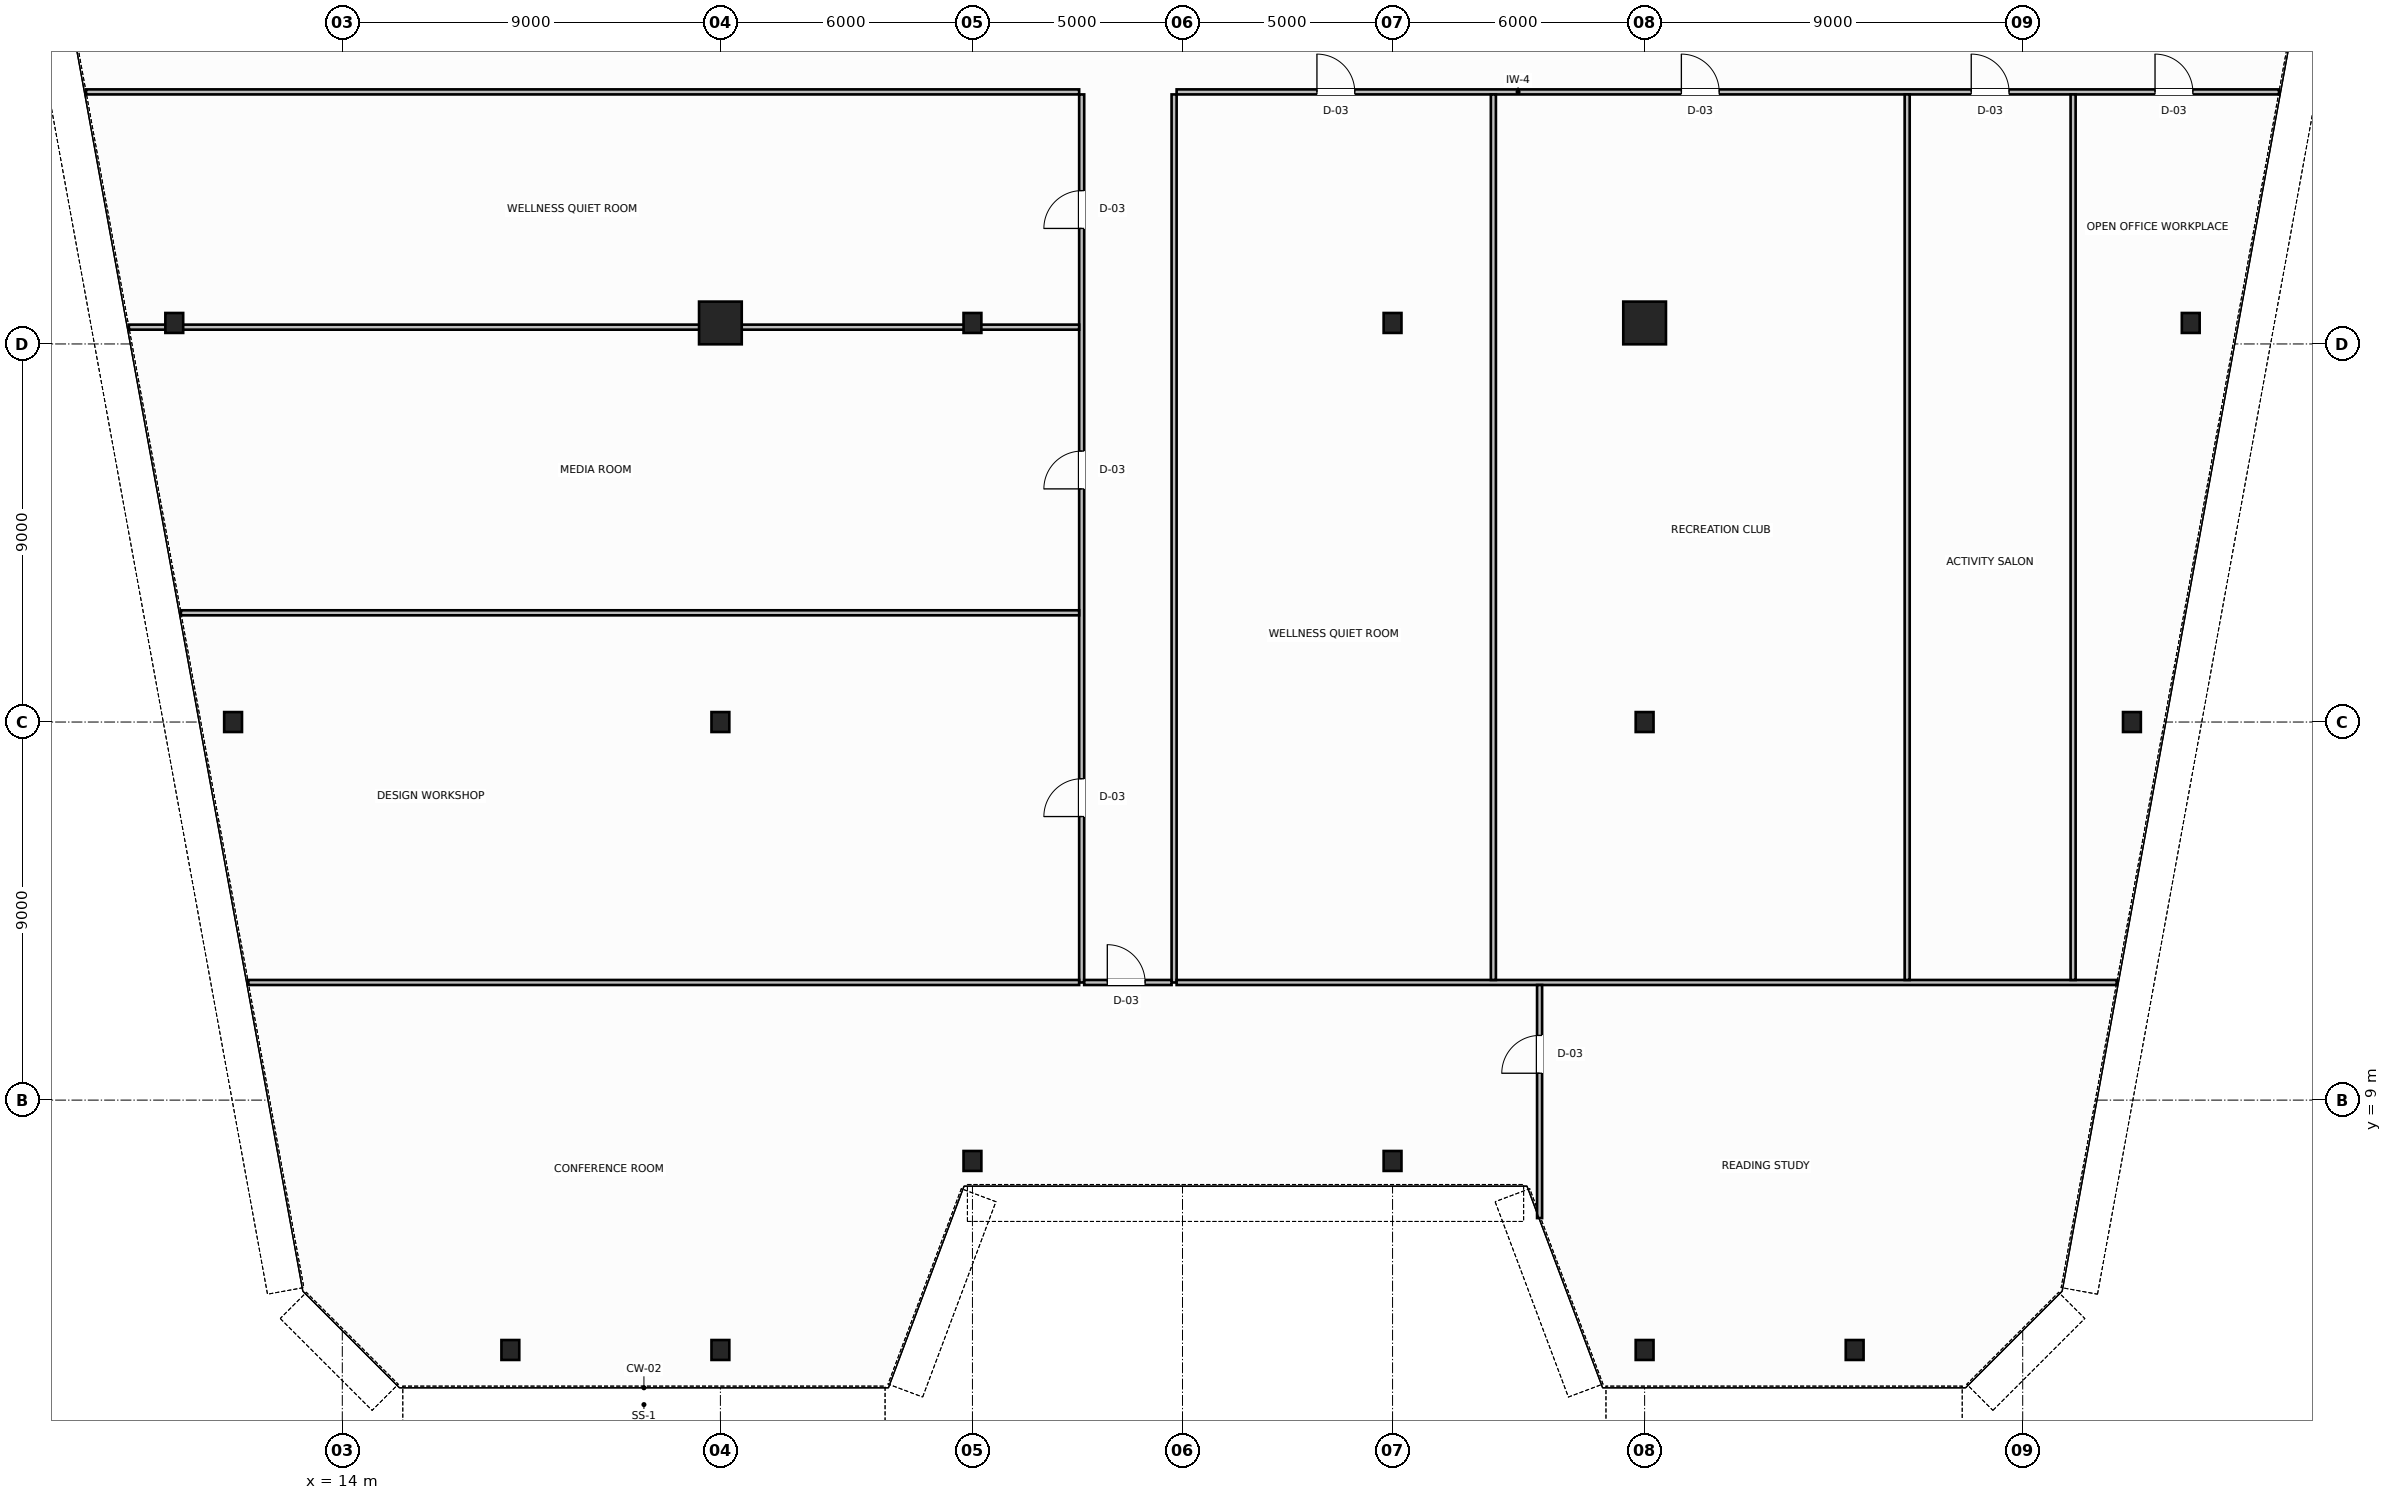
"""IFC4 building model, lengths in metres.
Left out: names, types, materials, properties, quantities, classifications, styles, units other than length and angle.
Written with IfcOpenShell. Run it as: python <this file> out.ifc"""

import sys

from ifc_helpers import new_model, si_unit, direction, frame, frame_2d, origin, origin_2d, place, context, subcontext, project, spatial, rectangle, hollow_circle, i_section, extrude, source, transform, mapped, element, fill, save


model = new_model("IFC4")
c1 = context("Model", 3, precision=1e-05, world=origin(), true_north=direction((0.0, 1.0)))
c2 = subcontext(c1, "Body", "Model", "MODEL_VIEW")
j1 = project(units=[si_unit("LENGTHUNIT", "METRE"), si_unit("PLANEANGLEUNIT", "RADIAN")], contexts=[c1])
p1 = place(None, origin())
s1 = spatial("IfcSite", under=j1, at=p1, CompositionType="ELEMENT")
p2 = place(p1, origin())
s2 = spatial("IfcBuilding", under=s1, at=p2, CompositionType="ELEMENT")
p3 = place(p2, frame((0.0, 0.0, 111.0)))
s3 = spatial("IfcBuildingStorey", under=s2, at=p3, CompositionType="ELEMENT", Elevation=111.0)
m1 = source(origin(), c2, "Body", "SweptSolid", [
    extrude(i_section(OverallWidth=0.424, OverallDepth=0.474, WebThickness=0.047, FlangeThickness=0.065, FilletRadius=0.015, at=origin_2d()), origin(), (0.0, 0.0, 1.0), 3.8),
])
for number, where, z_axis, x_axis in (
    (1, (10.0, 27.5, 0.0), (0.0, 0.0, 1.0), (1.0, 0.0, 0.0)),
    (2, (11.4, 18.0, 0.0), (0.0, 0.0, 1.0), (1.0, 0.0, 0.0)),
    (3, (58.0, 27.5, 0.0), (0.0, 0.0, 1.0), (1.0, 0.0, 0.0)),
    (4, (56.6, 18.0, 0.0), (0.0, 0.0, 1.0), (1.0, 0.0, 0.0)),
):
    element("IfcColumn", number, at=place(p3, frame(where, z_axis=z_axis, x_axis=x_axis)), inside=s3, PredefinedType="COLUMN", context=c2, shape_type="MappedRepresentation", body=[
        mapped(m1, transform((0.0, 0.0, 0.0), scale=1.0)),
    ])
m2 = source(origin(), c2, "Body", "SweptSolid", [
    extrude(hollow_circle(Radius=0.508, WallThickness=0.045, at=origin_2d()), origin(), (0.0, 0.0, 1.0), 3.8),
])
p4 = place(p3, frame((23.0, 27.5, 0.0), z_axis=(0.0, 0.0, 1.0), x_axis=(1.0, 0.0, 0.0)))
e5 = element("IfcColumn", 5, at=p4, inside=s3, PredefinedType="COLUMN", context=c2, shape_type="MappedRepresentation", body=[
    mapped(m2, transform((0.0, 0.0, 0.0), scale=1.0)),
])
m3 = source(origin(), c2, "Body", "SweptSolid", [
    extrude(i_section(OverallWidth=0.424, OverallDepth=0.474, WebThickness=0.047, FlangeThickness=0.065, FilletRadius=0.015, at=origin_2d()), origin(), (0.0, 0.0, 1.0), 3.8),
])
for number, where, z_axis, x_axis in (
    (6, (29.0, 27.5, 0.0), (0.0, 0.0, 1.0), (1.0, 0.0, 0.0)),
    (7, (39.0, 27.5, 0.0), (0.0, 0.0, 1.0), (1.0, 0.0, 0.0)),
):
    element("IfcColumn", number, at=place(p3, frame(where, z_axis=z_axis, x_axis=x_axis)), inside=s3, PredefinedType="COLUMN", context=c2, shape_type="MappedRepresentation", body=[
        mapped(m3, transform((0.0, 0.0, 0.0), scale=1.0)),
    ])
p5 = place(p3, frame((45.0, 27.5, 0.0), z_axis=(0.0, 0.0, 1.0), x_axis=(1.0, 0.0, 0.0)))
e8 = element("IfcColumn", 8, at=p5, inside=s3, PredefinedType="COLUMN", context=c2, shape_type="MappedRepresentation", body=[
    mapped(m2, transform((0.0, 0.0, 0.0), scale=1.0)),
])
for number, where, z_axis, x_axis in (
    (9, (23.0, 18.0, 0.0), (0.0, 0.0, 1.0), (1.0, 0.0, 0.0)),
    (10, (45.0, 18.0, 0.0), (0.0, 0.0, 1.0), (1.0, 0.0, 0.0)),
):
    element("IfcColumn", number, at=place(p3, frame(where, z_axis=z_axis, x_axis=x_axis)), inside=s3, PredefinedType="COLUMN", context=c2, shape_type="MappedRepresentation", body=[
        mapped(m3, transform((0.0, 0.0, 0.0), scale=1.0)),
    ])
m4 = source(origin(), c2, "Body", "SweptSolid", [
    extrude(i_section(OverallWidth=0.424, OverallDepth=0.474, WebThickness=0.047, FlangeThickness=0.065, FilletRadius=0.015, at=origin_2d()), origin(), (0.0, 0.0, 1.0), 3.744),
])
for number, where, z_axis, x_axis in (
    (11, (18.0, 3.052, 0.032), (0.0, -0.064, 0.998), (1.0, 0.0, 0.0)),
    (12, (23.0, 3.052, 0.032), (0.0, -0.064, 0.998), (1.0, 0.0, 0.0)),
    (13, (29.0, 7.552, 0.032), (0.0, -0.064, 0.998), (1.0, 0.0, 0.0)),
    (14, (39.0, 7.552, 0.032), (0.0, -0.064, 0.998), (1.0, 0.0, 0.0)),
    (15, (45.0, 3.052, 0.032), (0.0, -0.064, 0.998), (1.0, 0.0, 0.0)),
    (16, (50.0, 3.052, 0.032), (0.0, -0.064, 0.998), (1.0, 0.0, 0.0)),
):
    element("IfcColumn", number, at=place(p3, frame(where, z_axis=z_axis, x_axis=x_axis)), inside=s3, PredefinedType="COLUMN", context=c2, shape_type="MappedRepresentation", body=[
        mapped(m4, transform((0.0, 0.0, 0.0), scale=1.0)),
    ])
p6 = place(p3, frame((7.9, 33.0, 0.0), z_axis=(0.0, 0.0, 1.0), x_axis=(1.0, 0.0, 0.0)))
e17 = element("IfcWall", 17, at=p6, inside=s3, PredefinedType="PARTITIONING", context=c2, shape_type="SweptSolid", body=[
    extrude(rectangle(XDim=23.64, YDim=0.12, at=frame_2d((11.82, 0.0))), origin(), (0.0, 0.0, 1.0), 3.58),
])
p7 = place(p3, frame((33.86, 33.0, 0.0), z_axis=(0.0, 0.0, 1.0), x_axis=(1.0, 0.0, 0.0)))
e18 = element("IfcWall", 18, at=p7, inside=s3, PredefinedType="PARTITIONING", context=c2, shape_type="SweptSolid", body=[
    extrude(rectangle(XDim=26.24, YDim=0.12, at=frame_2d((13.12, 0.0))), origin(), (0.0, 0.0, 1.0), 3.58),
])
p8 = place(p7, frame((3.34, 0.0, 0.0)))
e19 = element("IfcOpeningElement", 19, at=p8, cuts=e18, PredefinedType="OPENING", context=c2, shape_type="SweptSolid", body=[
    extrude(rectangle(XDim=0.9, YDim=2.15, at=frame_2d((0.45, 1.075))), frame((0.0, 0.07, 0.0), z_axis=(0.0, -1.0, 0.0), x_axis=(1.0, 0.0, 0.0)), (0.0, 0.0, 1.0), 0.14),
])
p9 = place(p7, frame((12.015, 0.0, 0.0)))
e20 = element("IfcOpeningElement", 20, at=p9, cuts=e18, PredefinedType="OPENING", context=c2, shape_type="SweptSolid", body=[
    extrude(rectangle(XDim=0.9, YDim=2.15, at=frame_2d((0.45, 1.075))), frame((0.0, 0.07, 0.0), z_axis=(0.0, -1.0, 0.0), x_axis=(1.0, 0.0, 0.0)), (0.0, 0.0, 1.0), 0.14),
])
p10 = place(p7, frame((18.915, 0.0, 0.0)))
e21 = element("IfcOpeningElement", 21, at=p10, cuts=e18, PredefinedType="OPENING", context=c2, shape_type="SweptSolid", body=[
    extrude(rectangle(XDim=0.9, YDim=2.15, at=frame_2d((0.45, 1.075))), frame((0.0, 0.07, 0.0), z_axis=(0.0, -1.0, 0.0), x_axis=(1.0, 0.0, 0.0)), (0.0, 0.0, 1.0), 0.14),
])
p11 = place(p7, frame((23.29, 0.0, 0.0)))
e22 = element("IfcOpeningElement", 22, at=p11, cuts=e18, PredefinedType="OPENING", context=c2, shape_type="SweptSolid", body=[
    extrude(rectangle(XDim=0.9, YDim=2.15, at=frame_2d((0.45, 1.075))), frame((0.0, 0.07, 0.0), z_axis=(0.0, -1.0, 0.0), x_axis=(1.0, 0.0, 0.0)), (0.0, 0.0, 1.0), 0.14),
])
p12 = place(p3, frame((31.6, 11.8, 0.0), z_axis=(0.0, 0.0, 1.0), x_axis=(0.0, 1.0, 0.0)))
e23 = element("IfcWall", 23, at=p12, inside=s3, PredefinedType="PARTITIONING", context=c2, shape_type="SweptSolid", body=[
    extrude(rectangle(XDim=21.14, YDim=0.12, at=frame_2d((10.57, 0.0))), origin(), (0.0, 0.0, 1.0), 3.58),
])
p13 = place(p12, frame((3.95, 0.0, 0.0)))
e24 = element("IfcOpeningElement", 24, at=p13, cuts=e23, PredefinedType="OPENING", context=c2, shape_type="SweptSolid", body=[
    extrude(rectangle(XDim=0.9, YDim=2.15, at=frame_2d((0.45, 1.075))), frame((0.0, 0.07, 0.0), z_axis=(0.0, -1.0, 0.0), x_axis=(1.0, 0.0, 0.0)), (0.0, 0.0, 1.0), 0.14),
])
p14 = place(p12, frame((11.75, 0.0, 0.0)))
e25 = element("IfcOpeningElement", 25, at=p14, cuts=e23, PredefinedType="OPENING", context=c2, shape_type="SweptSolid", body=[
    extrude(rectangle(XDim=0.9, YDim=2.15, at=frame_2d((0.45, 1.075))), frame((0.0, 0.07, 0.0), z_axis=(0.0, -1.0, 0.0), x_axis=(1.0, 0.0, 0.0)), (0.0, 0.0, 1.0), 0.14),
])
p15 = place(p12, frame((17.95, 0.0, 0.0)))
e26 = element("IfcOpeningElement", 26, at=p15, cuts=e23, PredefinedType="OPENING", context=c2, shape_type="SweptSolid", body=[
    extrude(rectangle(XDim=0.9, YDim=2.15, at=frame_2d((0.45, 1.075))), frame((0.0, 0.07, 0.0), z_axis=(0.0, -1.0, 0.0), x_axis=(1.0, 0.0, 0.0)), (0.0, 0.0, 1.0), 0.14),
])
p16 = place(p3, frame((33.8, 11.8, 0.0), z_axis=(0.0, 0.0, 1.0), x_axis=(0.0, 1.0, 0.0)))
e27 = element("IfcWall", 27, at=p16, inside=s3, PredefinedType="PARTITIONING", context=c2, shape_type="SweptSolid", body=[
    extrude(rectangle(XDim=21.14, YDim=0.12, at=frame_2d((10.57, 0.0))), origin(), (0.0, 0.0, 1.0), 3.58),
])
p17 = place(p3, frame((31.66, 11.8, 0.0), z_axis=(0.0, 0.0, 1.0), x_axis=(1.0, 0.0, 0.0)))
e28 = element("IfcWall", 28, at=p17, inside=s3, PredefinedType="PARTITIONING", context=c2, shape_type="SweptSolid", body=[
    extrude(rectangle(XDim=2.08, YDim=0.12, at=frame_2d((1.04, 0.0))), origin(), (0.0, 0.0, 1.0), 3.58),
])
p18 = place(p17, frame((0.55, 0.0, 0.0)))
e29 = element("IfcOpeningElement", 29, at=p18, cuts=e28, PredefinedType="OPENING", context=c2, shape_type="SweptSolid", body=[
    extrude(rectangle(XDim=0.9, YDim=2.15, at=frame_2d((0.45, 1.075))), frame((0.0, 0.07, 0.0), z_axis=(0.0, -1.0, 0.0), x_axis=(1.0, 0.0, 0.0)), (0.0, 0.0, 1.0), 0.14),
])
p19 = place(p3, frame((11.761, 11.8, 0.0), z_axis=(0.0, 0.0, 1.0), x_axis=(1.0, 0.0, 0.0)))
e30 = element("IfcWall", 30, at=p19, inside=s3, PredefinedType="PARTITIONING", context=c2, shape_type="SweptSolid", body=[
    extrude(rectangle(XDim=19.779, YDim=0.12, at=frame_2d((9.889, 0.0))), origin(), (0.0, 0.0, 1.0), 3.58),
])
p20 = place(p3, frame((33.86, 11.8, 0.0), z_axis=(0.0, 0.0, 1.0), x_axis=(1.0, 0.0, 0.0)))
e31 = element("IfcWall", 31, at=p20, inside=s3, PredefinedType="PARTITIONING", context=c2, shape_type="SweptSolid", body=[
    extrude(rectangle(XDim=22.378, YDim=0.12, at=frame_2d((11.189, 0.0))), origin(), (0.0, 0.0, 1.0), 3.58),
])
p21 = place(p3, frame((42.5, 6.192, 0.0), z_axis=(0.0, 0.0, 1.0), x_axis=(0.0, 1.0, 0.0)))
e32 = element("IfcWall", 32, at=p21, inside=s3, PredefinedType="PARTITIONING", context=c2, shape_type="SweptSolid", body=[
    extrude(rectangle(XDim=5.548, YDim=0.12, at=frame_2d((2.774, 0.0))), origin(), (0.0, 0.0, 1.0), 3.58),
])
p22 = place(p21, frame((3.448, 0.0, 0.0)))
e33 = element("IfcOpeningElement", 33, at=p22, cuts=e32, PredefinedType="OPENING", context=c2, shape_type="SweptSolid", body=[
    extrude(rectangle(XDim=0.9, YDim=2.15, at=frame_2d((0.45, 1.075))), frame((0.0, 0.07, 0.0), z_axis=(0.0, -1.0, 0.0), x_axis=(1.0, 0.0, 0.0)), (0.0, 0.0, 1.0), 0.14),
])
p23 = place(p3, frame((10.158, 20.6, 0.0), z_axis=(0.0, 0.0, 1.0), x_axis=(1.0, 0.0, 0.0)))
e34 = element("IfcWall", 34, at=p23, inside=s3, PredefinedType="PARTITIONING", context=c2, shape_type="SweptSolid", body=[
    extrude(rectangle(XDim=21.382, YDim=0.12, at=frame_2d((10.691, 0.0))), origin(), (0.0, 0.0, 1.0), 3.58),
])
p24 = place(p3, frame((8.92, 27.4, 0.0), z_axis=(0.0, 0.0, 1.0), x_axis=(1.0, 0.0, 0.0)))
e35 = element("IfcWall", 35, at=p24, inside=s3, PredefinedType="PARTITIONING", context=c2, shape_type="SweptSolid", body=[
    extrude(rectangle(XDim=22.62, YDim=0.12, at=frame_2d((11.31, 0.0))), origin(), (0.0, 0.0, 1.0), 2.87),
])
for number, where, z_axis, x_axis in (
    (36, (41.4, 11.86, 0.0), (0.0, 0.0, 1.0), (0.0, 1.0, 0.0)),
    (37, (51.25, 11.86, 0.0), (0.0, 0.0, 1.0), (0.0, 1.0, 0.0)),
    (38, (55.2, 11.86, 0.0), (0.0, 0.0, 1.0), (0.0, 1.0, 0.0)),
):
    element("IfcWall", number, at=place(p3, frame(where, z_axis=z_axis, x_axis=x_axis)), inside=s3, PredefinedType="PARTITIONING", context=c2, shape_type="SweptSolid", body=[
        extrude(rectangle(XDim=21.08, YDim=0.12, at=frame_2d((10.54, 0.0))), origin(), (0.0, 0.0, 1.0), 3.58),
    ])
m5 = source(origin(), c2, "Body", "SweptSolid", [
    extrude(rectangle(XDim=0.9, YDim=2.15, at=frame_2d((0.45, 1.075))), frame((0.0, 0.025, 0.0), z_axis=(0.0, -1.0, 0.0), x_axis=(1.0, 0.0, 0.0)), (0.0, 0.0, 1.0), 0.05),
])
p25 = place(p18, origin())
e39 = element("IfcDoor", 39, at=p25, inside=s3, OperationType="SINGLE_SWING_LEFT", PredefinedType="DOOR", context=c2, shape_type="MappedRepresentation", body=[
    mapped(m5, transform((0.0, 0.0, 0.0), scale=1.0)),
])
fill(e29, e39)
p26 = place(p22, origin())
e40 = element("IfcDoor", 40, at=p26, inside=s3, OperationType="SINGLE_SWING_RIGHT", PredefinedType="DOOR", context=c2, shape_type="MappedRepresentation", body=[
    mapped(m5, transform((0.0, 0.0, 0.0), scale=1.0)),
])
fill(e33, e40)
p27 = place(p13, origin())
e41 = element("IfcDoor", 41, at=p27, inside=s3, OperationType="SINGLE_SWING_LEFT", PredefinedType="DOOR", context=c2, shape_type="MappedRepresentation", body=[
    mapped(m5, transform((0.0, 0.0, 0.0), scale=1.0)),
])
fill(e24, e41)
p28 = place(p14, origin())
e42 = element("IfcDoor", 42, at=p28, inside=s3, OperationType="SINGLE_SWING_RIGHT", PredefinedType="DOOR", context=c2, shape_type="MappedRepresentation", body=[
    mapped(m5, transform((0.0, 0.0, 0.0), scale=1.0)),
])
fill(e25, e42)
p29 = place(p15, origin())
e43 = element("IfcDoor", 43, at=p29, inside=s3, OperationType="SINGLE_SWING_LEFT", PredefinedType="DOOR", context=c2, shape_type="MappedRepresentation", body=[
    mapped(m5, transform((0.0, 0.0, 0.0), scale=1.0)),
])
fill(e26, e43)
p30 = place(p8, origin())
e44 = element("IfcDoor", 44, at=p30, inside=s3, OperationType="SINGLE_SWING_RIGHT", PredefinedType="DOOR", context=c2, shape_type="MappedRepresentation", body=[
    mapped(m5, transform((0.0, 0.0, 0.0), scale=1.0)),
])
fill(e19, e44)
p31 = place(p9, origin())
e45 = element("IfcDoor", 45, at=p31, inside=s3, OperationType="SINGLE_SWING_LEFT", PredefinedType="DOOR", context=c2, shape_type="MappedRepresentation", body=[
    mapped(m5, transform((0.0, 0.0, 0.0), scale=1.0)),
])
fill(e20, e45)
p32 = place(p10, origin())
e46 = element("IfcDoor", 46, at=p32, inside=s3, OperationType="SINGLE_SWING_RIGHT", PredefinedType="DOOR", context=c2, shape_type="MappedRepresentation", body=[
    mapped(m5, transform((0.0, 0.0, 0.0), scale=1.0)),
])
fill(e21, e46)
p33 = place(p11, origin())
e47 = element("IfcDoor", 47, at=p33, inside=s3, OperationType="SINGLE_SWING_LEFT", PredefinedType="DOOR", context=c2, shape_type="MappedRepresentation", body=[
    mapped(m5, transform((0.0, 0.0, 0.0), scale=1.0)),
])
fill(e22, e47)
save(model, sys.argv[1])
